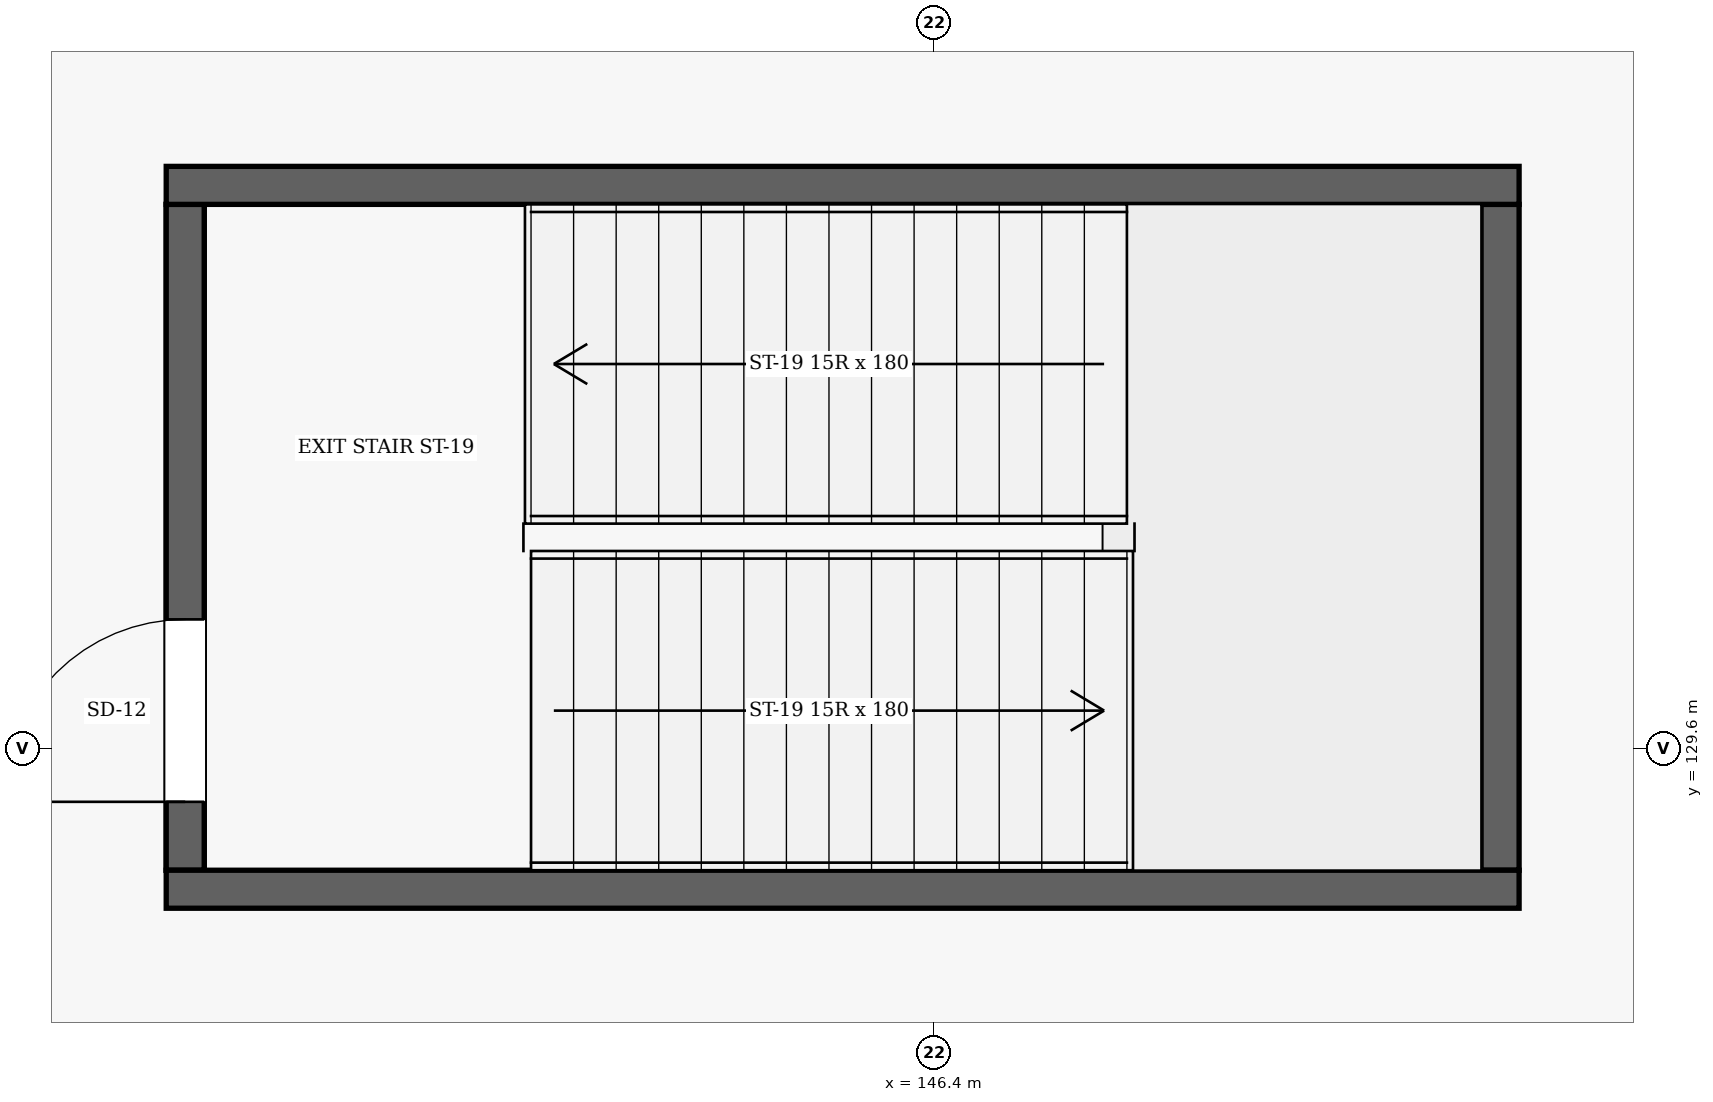
"""IFC4 building model, lengths in metres.
Left out: names, types, materials, properties, quantities, classifications, styles, units other than length and angle.
Written with IfcOpenShell. Run it as: python <this file> out.ifc"""

import sys

from ifc_helpers import new_model, si_unit, direction, frame, frame_2d, origin, place, context, subcontext, project, spatial, rectangle, extrude, element, fill, save


model = new_model("IFC4")
c1 = context("Model", 3, precision=1e-05, world=origin(), true_north=direction((0.0, 1.0)))
c2 = subcontext(c1, "Body", "Model", "MODEL_VIEW")
j1 = project(units=[si_unit("LENGTHUNIT", "METRE"), si_unit("PLANEANGLEUNIT", "RADIAN")], contexts=[c1])
p1 = place(None, origin())
s1 = spatial("IfcSite", under=j1, at=p1, CompositionType="ELEMENT")
p2 = place(p1, origin())
s2 = spatial("IfcBuilding", under=s1, at=p2, CompositionType="ELEMENT")
p3 = place(p2, origin())
s3 = spatial("IfcBuildingStorey", under=s2, at=p3, CompositionType="ELEMENT", Elevation=0.0)
p4 = place(p3, frame((141.475, 128.8, -1.65), z_axis=(0.0, 0.0, 1.0), x_axis=(0.0, 1.0, 0.0)))
e1 = element("IfcWall", 1, at=p4, inside=s3, PredefinedType="SHEAR", context=c2, shape_type="SweptSolid", body=[
    extrude(rectangle(XDim=4.38, YDim=0.25, at=frame_2d((2.19, 0.0))), origin(), (0.0, 0.0, 1.0), 1.31),
])
p5 = place(p3, frame((141.475, 128.8, 0.0), z_axis=(0.0, 0.0, 1.0), x_axis=(0.0, 1.0, 0.0)))
e2 = element("IfcWall", 2, at=p5, inside=s3, PredefinedType="SHEAR", context=c2, shape_type="SweptSolid", body=[
    extrude(rectangle(XDim=4.38, YDim=0.25, at=frame_2d((2.19, 0.0))), origin(), (0.0, 0.0, 1.0), 5.12),
])
p6 = place(p5, frame((0.45, 0.0, 0.0)))
e3 = element("IfcOpeningElement", 3, at=p6, cuts=e2, PredefinedType="OPENING", context=c2, shape_type="SweptSolid", body=[
    extrude(rectangle(XDim=1.2, YDim=2.15, at=frame_2d((0.6, 1.075))), frame((0.0, 0.135, 0.0), z_axis=(0.0, -1.0, 0.0), x_axis=(1.0, 0.0, 0.0)), (0.0, 0.0, 1.0), 0.27),
])
p7 = place(p3, frame((150.125, 128.8, -1.65), z_axis=(0.0, 0.0, 1.0), x_axis=(0.0, 1.0, 0.0)))
e4 = element("IfcWall", 4, at=p7, inside=s3, PredefinedType="SHEAR", context=c2, shape_type="SweptSolid", body=[
    extrude(rectangle(XDim=4.38, YDim=0.25, at=frame_2d((2.19, 0.0))), origin(), (0.0, 0.0, 1.0), 6.77),
])
for number, where, z_axis, x_axis in (
    (5, (141.35, 128.675, -1.65), (0.0, 0.0, 1.0), (1.0, 0.0, 0.0)),
    (6, (141.35, 133.305, -1.65), (0.0, 0.0, 1.0), (1.0, 0.0, 0.0)),
):
    element("IfcWall", number, at=place(p3, frame(where, z_axis=z_axis, x_axis=x_axis)), inside=s3, PredefinedType="SHEAR", context=c2, shape_type="SweptSolid", body=[
        extrude(rectangle(XDim=8.9, YDim=0.25, at=frame_2d((4.45, 0.0))), origin(), (0.0, 0.0, 1.0), 6.77),
    ])
p8 = place(p6, origin())
e7 = element("IfcDoor", 7, at=p8, inside=s3, OperationType="SINGLE_SWING_LEFT", PredefinedType="DOOR", context=c2, shape_type="SweptSolid", body=[
    extrude(rectangle(XDim=1.2, YDim=2.15, at=frame_2d((0.6, 1.075))), frame((0.0, 0.025, 0.0), z_axis=(0.0, -1.0, 0.0), x_axis=(1.0, 0.0, 0.0)), (0.0, 0.0, 1.0), 0.05),
])
fill(e3, e7)
save(model, sys.argv[1])
